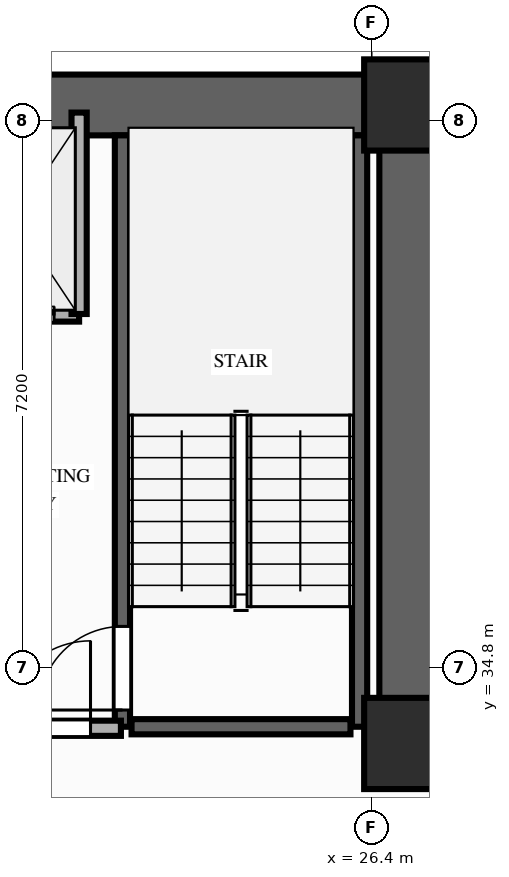
"""IFC4 building model, lengths in metres.
Left out: names, types, materials, properties, quantities, classifications, styles, units other than length and angle.
Written with IfcOpenShell. Run it as: python <this file> out.ifc"""

import sys

from ifc_helpers import new_model, si_unit, direction, frame, frame_2d, origin, origin_2d, place, context, subcontext, project, spatial, rectangle, extrude, element, fill, save


model = new_model("IFC4")
c1 = context("Model", 3, precision=1e-05, world=origin(), true_north=direction((0.0, 1.0)))
c2 = subcontext(c1, "Body", "Model", "MODEL_VIEW")
j1 = project(units=[si_unit("LENGTHUNIT", "METRE"), si_unit("PLANEANGLEUNIT", "RADIAN")], contexts=[c1])
p1 = place(None, origin())
s1 = spatial("IfcSite", under=j1, at=p1, CompositionType="ELEMENT")
p2 = place(p1, origin())
s2 = spatial("IfcBuilding", under=s1, at=p2, CompositionType="ELEMENT")
p3 = place(p2, frame((0.0, 0.0, 30.2)))
s3 = spatial("IfcBuildingStorey", under=s2, at=p3, CompositionType="ELEMENT", Elevation=30.2)
for number, where, z_axis, x_axis in (
    (1, (26.9, 33.8, 0.0), (0.0, 0.0, 1.0), (1.0, 0.0, 0.0)),
    (2, (26.9, 42.2, 0.0), (0.0, 0.0, 1.0), (1.0, 0.0, 0.0)),
):
    element("IfcColumn", number, at=place(p3, frame(where, z_axis=z_axis, x_axis=x_axis)), inside=s3, PredefinedType="COLUMN", context=c2, shape_type="SweptSolid", body=[
        extrude(rectangle(XDim=1.2, YDim=1.2, at=origin_2d()), origin(), (0.0, 0.0, 1.0), 3.2),
    ])
p4 = place(p3, frame((6.45, 42.2, 0.0), z_axis=(0.0, 0.0, 1.0), x_axis=(1.0, 0.0, 0.0)))
e3 = element("IfcWall", 3, at=p4, inside=s3, PredefinedType="SHEAR", context=c2, shape_type="SweptSolid", body=[
    extrude(rectangle(XDim=20.45, YDim=0.8, at=frame_2d((10.225, 0.0))), origin(), (0.0, 0.0, 1.0), 3.02),
])
p5 = place(p3, frame((26.9, 33.8, 0.0), z_axis=(0.0, 0.0, 1.0), x_axis=(0.0, 1.0, 0.0)))
e4 = element("IfcWall", 4, at=p5, inside=s3, PredefinedType="SHEAR", context=c2, shape_type="SweptSolid", body=[
    extrude(rectangle(XDim=7.95, YDim=0.8, at=frame_2d((3.975, 0.0))), origin(), (0.0, 0.0, 1.0), 3.02),
])
p6 = place(p3, frame((23.12, 34.02, 0.0), z_axis=(0.0, 0.0, 1.0), x_axis=(0.0, 1.0, 0.0)))
e5 = element("IfcWall", 5, at=p6, inside=s3, PredefinedType="SHEAR", context=c2, shape_type="SweptSolid", body=[
    extrude(rectangle(XDim=7.78, YDim=0.2, at=frame_2d((3.89, 0.0))), origin(), (0.0, 0.0, 1.0), 3.02),
])
p7 = place(p6, frame((0.22, 0.0, 0.0)))
e6 = element("IfcOpeningElement", 6, at=p7, cuts=e5, PredefinedType="OPENING", context=c2, shape_type="SweptSolid", body=[
    extrude(rectangle(XDim=1.1, YDim=2.15, at=frame_2d((0.55, 1.075))), frame((0.0, 0.11, 0.0), z_axis=(0.0, -1.0, 0.0), x_axis=(1.0, 0.0, 0.0)), (0.0, 0.0, 1.0), 0.22),
])
p8 = place(p3, frame((26.24, 34.02, 0.0), z_axis=(0.0, 0.0, 1.0), x_axis=(0.0, 1.0, 0.0)))
e7 = element("IfcWall", 7, at=p8, inside=s3, PredefinedType="SHEAR", context=c2, shape_type="SweptSolid", body=[
    extrude(rectangle(XDim=7.78, YDim=0.2, at=frame_2d((3.89, 0.0))), origin(), (0.0, 0.0, 1.0), 3.02),
])
p9 = place(p3, frame((23.24, 34.02, 0.0), z_axis=(0.0, 0.0, 1.0), x_axis=(1.0, 0.0, 0.0)))
e8 = element("IfcWall", 8, at=p9, inside=s3, PredefinedType="SHEAR", context=c2, shape_type="SweptSolid", body=[
    extrude(rectangle(XDim=2.88, YDim=0.2, at=frame_2d((1.44, 0.0))), origin(), (0.0, 0.0, 1.0), 3.02),
])
p10 = place(p3, frame((20.85, 39.45, 0.0), z_axis=(0.0, 0.0, 1.0), x_axis=(1.0, 0.0, 0.0)))
e9 = element("IfcWall", 9, at=p10, inside=s3, PredefinedType="MOVABLE", context=c2, shape_type="SweptSolid", body=[
    extrude(rectangle(XDim=1.7, YDim=0.2, at=frame_2d((0.85, 0.0))), origin(), (0.0, 0.0, 1.0), 3.02),
])
p11 = place(p10, frame((0.32, 0.0, 0.0)))
e10 = element("IfcOpeningElement", 10, at=p11, cuts=e9, PredefinedType="OPENING", context=c2, shape_type="SweptSolid", body=[
    extrude(rectangle(XDim=1.05, YDim=2.15, at=frame_2d((0.525, 1.075))), frame((0.0, 0.11, 0.0), z_axis=(0.0, -1.0, 0.0), x_axis=(1.0, 0.0, 0.0)), (0.0, 0.0, 1.0), 0.22),
])
p12 = place(p3, frame((22.55, 39.45, 0.0), z_axis=(0.0, 0.0, 1.0), x_axis=(0.0, 1.0, 0.0)))
e11 = element("IfcWall", 11, at=p12, inside=s3, PredefinedType="MOVABLE", context=c2, shape_type="SweptSolid", body=[
    extrude(rectangle(XDim=2.65, YDim=0.2, at=frame_2d((1.325, 0.0))), origin(), (0.0, 0.0, 1.0), 2.41),
])
p13 = place(p3, frame((20.5, 34.0, 0.0), z_axis=(0.0, 0.0, 1.0), x_axis=(1.0, 0.0, 0.0)))
e12 = element("IfcWall", 12, at=p13, inside=s3, PredefinedType="PARTITIONING", context=c2, shape_type="SweptSolid", body=[
    extrude(rectangle(XDim=2.6, YDim=0.2, at=frame_2d((1.3, 0.0))), origin(), (0.0, 0.0, 1.0), 2.41),
])
p14 = place(p13, frame((1.05, 0.0, 0.0)))
e13 = element("IfcOpeningElement", 13, at=p14, cuts=e12, PredefinedType="OPENING", context=c2, shape_type="SweptSolid", body=[
    extrude(rectangle(XDim=1.15, YDim=2.15, at=frame_2d((0.575, 1.075))), frame((0.0, 0.11, 0.0), z_axis=(0.0, -1.0, 0.0), x_axis=(1.0, 0.0, 0.0)), (0.0, 0.0, 1.0), 0.22),
])
p15 = place(p7, origin())
e14 = element("IfcDoor", 14, at=p15, inside=s3, OperationType="SINGLE_SWING_LEFT", PredefinedType="DOOR", context=c2, shape_type="SweptSolid", body=[
    extrude(rectangle(XDim=1.1, YDim=2.15, at=frame_2d((0.55, 1.075))), frame((0.0, 0.025, 0.0), z_axis=(0.0, -1.0, 0.0), x_axis=(1.0, 0.0, 0.0)), (0.0, 0.0, 1.0), 0.05),
])
fill(e6, e14)
p16 = place(p11, origin())
e15 = element("IfcDoor", 15, at=p16, inside=s3, OperationType="SLIDING_TO_LEFT", PredefinedType="DOOR", context=c2, shape_type="SweptSolid", body=[
    extrude(rectangle(XDim=1.05, YDim=2.15, at=frame_2d((0.525, 1.075))), frame((0.0, 0.025, 0.0), z_axis=(0.0, -1.0, 0.0), x_axis=(1.0, 0.0, 0.0)), (0.0, 0.0, 1.0), 0.05),
])
fill(e10, e15)
p17 = place(p14, origin())
e16 = element("IfcDoor", 16, at=p17, inside=s3, OperationType="SINGLE_SWING_RIGHT", PredefinedType="DOOR", context=c2, shape_type="SweptSolid", body=[
    extrude(rectangle(XDim=1.15, YDim=2.15, at=frame_2d((0.575, 1.075))), frame((0.0, 0.025, 0.0), z_axis=(0.0, -1.0, 0.0), x_axis=(1.0, 0.0, 0.0)), (0.0, 0.0, 1.0), 0.05),
])
fill(e13, e16)
save(model, sys.argv[1])
